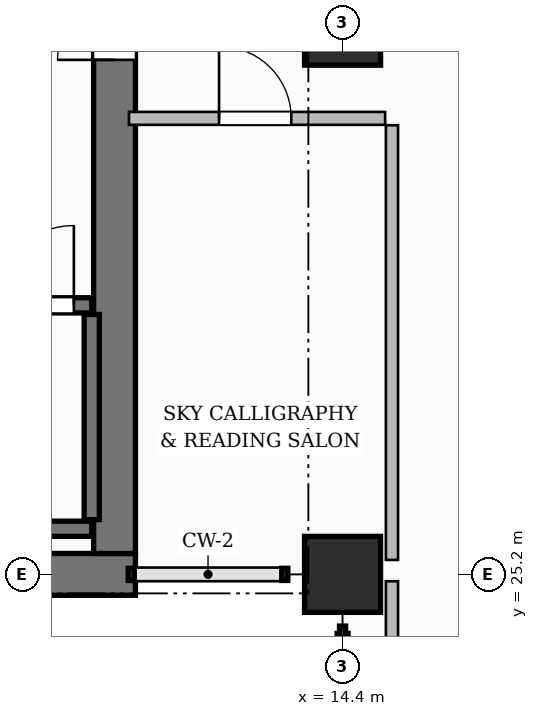
"""IFC4 building model, lengths in metres.
Left out: names, types, materials, properties, quantities, classifications, styles, units other than length and angle.
Written with IfcOpenShell. Run it as: python <this file> out.ifc"""

import sys

from ifc_helpers import new_model, si_unit, direction, frame, frame_2d, origin, origin_2d, place, context, subcontext, project, spatial, rectangle, extrude, source, transform, mapped, element, fill, save


model = new_model("IFC4")
c1 = context("Model", 3, precision=1e-05, world=origin(), true_north=direction((0.0, 1.0)))
c2 = subcontext(c1, "Body", "Model", "MODEL_VIEW")
j1 = project(units=[si_unit("LENGTHUNIT", "METRE"), si_unit("PLANEANGLEUNIT", "RADIAN")], contexts=[c1])
p1 = place(None, origin())
s1 = spatial("IfcSite", under=j1, at=p1, CompositionType="ELEMENT")
p2 = place(p1, origin())
s2 = spatial("IfcBuilding", under=s1, at=p2, CompositionType="ELEMENT")
p3 = place(p2, frame((0.0, 0.0, 115.5)))
s3 = spatial("IfcBuildingStorey", under=s2, at=p3, CompositionType="ELEMENT", Elevation=115.5)
p4 = place(p3, frame((3.325, 25.2, 0.0), z_axis=(0.0, 0.0, 1.0), x_axis=(1.0, 0.0, 0.0)))
e1 = element("IfcWall", 1, at=p4, inside=s3, PredefinedType="SHEAR", context=c2, shape_type="SweptSolid", body=[
    extrude(rectangle(XDim=8.35, YDim=0.55, at=frame_2d((4.175, 0.0))), origin(), (0.0, 0.0, 1.0), 3.7),
])
p5 = place(p3, frame((11.4, 25.475, 0.0), z_axis=(0.0, 0.0, 1.0), x_axis=(0.0, 1.0, 0.0)))
e2 = element("IfcWall", 2, at=p5, inside=s3, PredefinedType="SHEAR", context=c2, shape_type="SweptSolid", body=[
    extrude(rectangle(XDim=13.85, YDim=0.55, at=frame_2d((6.925, 0.0))), origin(), (0.0, 0.0, 1.0), 3.7),
])
p6 = place(p5, frame((6.495, 0.0, 0.0)))
e3 = element("IfcOpeningElement", 3, at=p6, cuts=e2, PredefinedType="OPENING", context=c2, shape_type="SweptSolid", body=[
    extrude(rectangle(XDim=1.5, YDim=2.2, at=frame_2d((0.75, 1.1))), frame((0.0, 0.285, 0.0), z_axis=(0.0, -1.0, 0.0), x_axis=(1.0, 0.0, 0.0)), (0.0, 0.0, 1.0), 0.57),
])
m1 = source(origin(), c2, "Body", "SweptSolid", [
    extrude(rectangle(XDim=1.0, YDim=1.0, at=origin_2d()), origin(), (0.0, 0.0, 1.0), 3.7),
])
for number, where, z_axis, x_axis in (
    (4, (14.4, 25.2, 0.0), (0.0, 0.0, 1.0), (1.0, 0.0, 0.0)),
    (5, (14.4, 32.4, 0.0), (0.0, 0.0, 1.0), (1.0, 0.0, 0.0)),
):
    element("IfcColumn", number, at=place(p3, frame(where, z_axis=z_axis, x_axis=x_axis)), inside=s3, PredefinedType="COLUMN", context=c2, shape_type="MappedRepresentation", body=[
        mapped(m1, transform((0.0, 0.0, 0.0), scale=1.0)),
    ])
p7 = place(p3, frame((4.0, 25.8, 0.0), z_axis=(0.0, 0.0, 1.0), x_axis=(1.0, 0.0, 0.0)))
e6 = element("IfcWall", 6, at=p7, inside=s3, PredefinedType="SHEAR", context=c2, shape_type="SweptSolid", body=[
    extrude(rectangle(XDim=7.1, YDim=0.2, at=frame_2d((3.55, 0.0))), origin(), (0.0, 0.0, 1.0), 3.7),
])
p8 = place(p3, frame((11.1, 25.92, 0.0), z_axis=(0.0, 0.0, 1.0), x_axis=(0.0, 1.0, 0.0)))
e7 = element("IfcWall", 7, at=p8, inside=s3, PredefinedType="SHEAR", context=c2, shape_type="SweptSolid", body=[
    extrude(rectangle(XDim=2.7, YDim=0.2, at=frame_2d((1.35, 0.0))), origin(), (0.0, 0.0, 1.0), 3.7),
])
p9 = place(p3, frame((4.0, 28.74, 0.0), z_axis=(0.0, 0.0, 1.0), x_axis=(1.0, 0.0, 0.0)))
e8 = element("IfcWall", 8, at=p9, inside=s3, PredefinedType="SHEAR", context=c2, shape_type="SweptSolid", body=[
    extrude(rectangle(XDim=7.1, YDim=0.2, at=frame_2d((3.55, 0.0))), origin(), (0.0, 0.0, 1.0), 3.7),
])
p10 = place(p9, frame((5.815, 0.0, 0.0)))
e9 = element("IfcOpeningElement", 9, at=p10, cuts=e8, PredefinedType="OPENING", context=c2, shape_type="SweptSolid", body=[
    extrude(rectangle(XDim=1.05, YDim=2.2, at=frame_2d((0.525, 1.1))), frame((0.0, 0.11, 0.0), z_axis=(0.0, -1.0, 0.0), x_axis=(1.0, 0.0, 0.0)), (0.0, 0.0, 1.0), 0.22),
])
p11 = place(p3, frame((15.05, 11.76, 0.0), z_axis=(0.0, 0.0, 1.0), x_axis=(0.0, 1.0, 0.0)))
e10 = element("IfcWall", 10, at=p11, inside=s3, PredefinedType="PARTITIONING", context=c2, shape_type="SweptSolid", body=[
    extrude(rectangle(XDim=13.35, YDim=0.16, at=frame_2d((6.675, 0.0))), origin(), (0.0, 0.0, 1.0), 3.45),
])
p12 = place(p3, frame((15.05, 25.39, 0.0), z_axis=(0.0, 0.0, 1.0), x_axis=(0.0, 1.0, 0.0)))
e11 = element("IfcWall", 11, at=p12, inside=s3, PredefinedType="PARTITIONING", context=c2, shape_type="SweptSolid", body=[
    extrude(rectangle(XDim=5.72, YDim=0.16, at=frame_2d((2.86, 0.0))), origin(), (0.0, 0.0, 1.0), 3.45),
])
p13 = place(p3, frame((11.59, 31.2, 0.0), z_axis=(0.0, 0.0, 1.0), x_axis=(1.0, 0.0, 0.0)))
e12 = element("IfcWall", 12, at=p13, inside=s3, PredefinedType="PARTITIONING", context=c2, shape_type="SweptSolid", body=[
    extrude(rectangle(XDim=3.37, YDim=0.17, at=frame_2d((1.685, 0.0))), origin(), (0.0, 0.0, 1.0), 3.45),
])
p14 = place(p13, frame((1.185, 0.0, 0.0)))
e13 = element("IfcOpeningElement", 13, at=p14, cuts=e12, PredefinedType="OPENING", context=c2, shape_type="SweptSolid", body=[
    extrude(rectangle(XDim=0.95, YDim=2.15, at=frame_2d((0.475, 1.075))), frame((0.0, 0.095, 0.0), z_axis=(0.0, -1.0, 0.0), x_axis=(1.0, 0.0, 0.0)), (0.0, 0.0, 1.0), 0.19),
])
m2 = source(origin(), c2, "Body", "SweptSolid", [
    extrude(rectangle(XDim=1.05, YDim=2.2, at=frame_2d((0.525, 1.1))), frame((0.0, 0.025, 0.0), z_axis=(0.0, -1.0, 0.0), x_axis=(1.0, 0.0, 0.0)), (0.0, 0.0, 1.0), 0.05),
])
p15 = place(p10, origin())
e14 = element("IfcDoor", 14, at=p15, inside=s3, OperationType="SINGLE_SWING_RIGHT", PredefinedType="DOOR", context=c2, shape_type="MappedRepresentation", body=[
    mapped(m2, transform((0.0, 0.0, 0.0), scale=1.0)),
])
fill(e9, e14)
m3 = source(origin(), c2, "Body", "SweptSolid", [
    extrude(rectangle(XDim=1.5, YDim=2.2, at=frame_2d((0.75, 1.1))), frame((0.0, 0.025, 0.0), z_axis=(0.0, -1.0, 0.0), x_axis=(1.0, 0.0, 0.0)), (0.0, 0.0, 1.0), 0.05),
])
p16 = place(p6, origin())
e15 = element("IfcDoor", 15, at=p16, inside=s3, OperationType="DOUBLE_DOOR_SINGLE_SWING", PredefinedType="DOOR", context=c2, shape_type="MappedRepresentation", body=[
    mapped(m3, transform((0.0, 0.0, 0.0), scale=1.0)),
])
fill(e3, e15)
m4 = source(origin(), c2, "Body", "SweptSolid", [
    extrude(rectangle(XDim=0.95, YDim=2.15, at=frame_2d((0.475, 1.075))), frame((0.0, 0.025, 0.0), z_axis=(0.0, -1.0, 0.0), x_axis=(1.0, 0.0, 0.0)), (0.0, 0.0, 1.0), 0.05),
])
p17 = place(p14, origin())
e16 = element("IfcDoor", 16, at=p17, inside=s3, OperationType="SINGLE_SWING_LEFT", PredefinedType="DOOR", context=c2, shape_type="MappedRepresentation", body=[
    mapped(m4, transform((0.0, 0.0, 0.0), scale=1.0)),
])
fill(e13, e16)
save(model, sys.argv[1])
